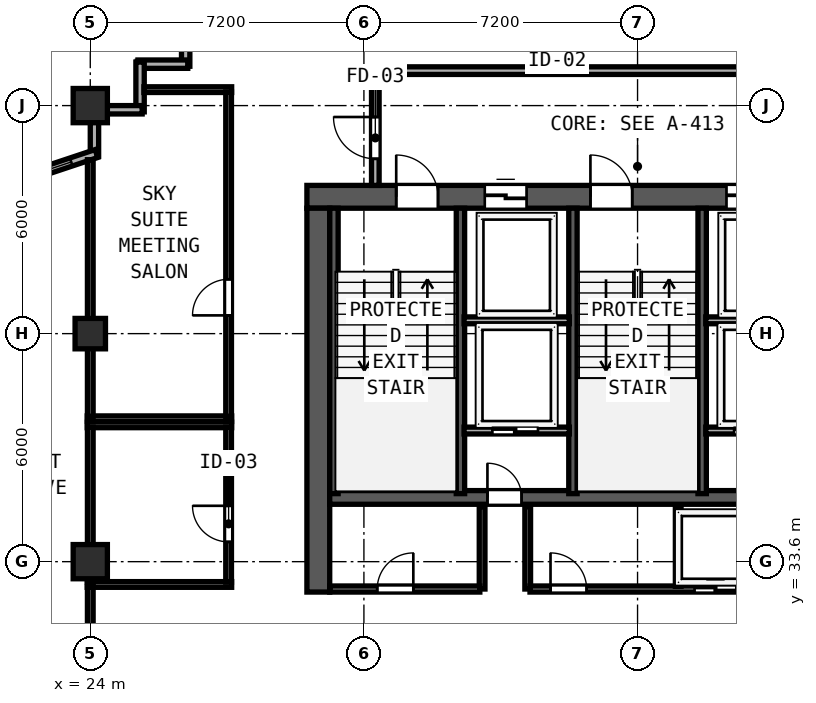
"""IFC4 building model, lengths in metres.
Left out: names, types, materials, properties, quantities, classifications, styles, units other than length and angle.
Written with IfcOpenShell. Run it as: python <this file> out.ifc"""

import sys

from ifc_helpers import new_model, si_unit, direction, frame, frame_2d, origin, origin_2d, place, context, subcontext, project, spatial, rectangle, hollow_rectangle, extrude, element, fill, save


model = new_model("IFC4")
c1 = context("Model", 3, precision=1e-05, world=origin(), true_north=direction((0.0, 1.0)))
c2 = subcontext(c1, "Body", "Model", "MODEL_VIEW")
j1 = project(units=[si_unit("LENGTHUNIT", "METRE"), si_unit("PLANEANGLEUNIT", "RADIAN")], contexts=[c1])
p1 = place(None, origin())
s1 = spatial("IfcSite", under=j1, at=p1, CompositionType="ELEMENT")
p2 = place(p1, origin())
s2 = spatial("IfcBuilding", under=s1, at=p2, CompositionType="ELEMENT")
p3 = place(p2, frame((0.0, 0.0, 191.8)))
s3 = spatial("IfcBuildingStorey", under=s2, at=p3, CompositionType="ELEMENT", Elevation=191.8)
p4 = place(p3, frame((29.7, 43.2, 0.0), z_axis=(0.0, 0.0, 1.0), x_axis=(1.0, 0.0, 0.0)))
e1 = element("IfcWall", 1, at=p4, inside=s3, PredefinedType="SHEAR", context=c2, shape_type="SweptSolid", body=[
    extrude(rectangle(XDim=17.4, YDim=0.6, at=frame_2d((8.7, 0.0))), origin(), (0.0, 0.0, 1.0), 3.62),
])
p5 = place(p4, frame((2.35, 0.0, 0.0)))
e2 = element("IfcOpeningElement", 2, at=p5, cuts=e1, PredefinedType="OPENING", context=c2, shape_type="SweptSolid", body=[
    extrude(rectangle(XDim=1.1, YDim=2.15, at=frame_2d((0.55, 1.075))), frame((0.0, 0.31, 0.0), z_axis=(0.0, -1.0, 0.0), x_axis=(1.0, 0.0, 0.0)), (0.0, 0.0, 1.0), 0.62),
])
p6 = place(p4, frame((7.46, 0.0, 0.0)))
e3 = element("IfcOpeningElement", 3, at=p6, cuts=e1, PredefinedType="OPENING", context=c2, shape_type="SweptSolid", body=[
    extrude(rectangle(XDim=1.1, YDim=2.15, at=frame_2d((0.55, 1.075))), frame((0.0, 0.31, 0.0), z_axis=(0.0, -1.0, 0.0), x_axis=(1.0, 0.0, 0.0)), (0.0, 0.0, 1.0), 0.62),
])
p7 = place(p4, frame((13.55, 0.0, 0.0)))
e4 = element("IfcOpeningElement", 4, at=p7, cuts=e1, PredefinedType="OPENING", context=c2, shape_type="SweptSolid", body=[
    extrude(rectangle(XDim=1.1, YDim=2.15, at=frame_2d((0.55, 1.075))), frame((0.0, 0.31, 0.0), z_axis=(0.0, -1.0, 0.0), x_axis=(1.0, 0.0, 0.0)), (0.0, 0.0, 1.0), 0.62),
])
p8 = place(p4, frame((4.68, 0.0, 0.0)))
e5 = element("IfcOpeningElement", 5, at=p8, cuts=e1, PredefinedType="OPENING", context=c2, shape_type="SweptSolid", body=[
    extrude(rectangle(XDim=1.1, YDim=2.2, at=frame_2d((0.55, 1.1))), frame((0.0, 0.31, 0.0), z_axis=(0.0, -1.0, 0.0), x_axis=(1.0, 0.0, 0.0)), (0.0, 0.0, 1.0), 0.62),
])
p9 = place(p4, frame((11.04, 0.0, 0.0)))
e6 = element("IfcOpeningElement", 6, at=p9, cuts=e1, PredefinedType="OPENING", context=c2, shape_type="SweptSolid", body=[
    extrude(rectangle(XDim=1.1, YDim=2.2, at=frame_2d((0.55, 1.1))), frame((0.0, 0.31, 0.0), z_axis=(0.0, -1.0, 0.0), x_axis=(1.0, 0.0, 0.0)), (0.0, 0.0, 1.0), 0.62),
])
p10 = place(p3, frame((30.0, 32.8, 0.0), z_axis=(0.0, 0.0, 1.0), x_axis=(0.0, 1.0, 0.0)))
e7 = element("IfcWall", 7, at=p10, inside=s3, PredefinedType="SHEAR", context=c2, shape_type="SweptSolid", body=[
    extrude(rectangle(XDim=10.1, YDim=0.6, at=frame_2d((5.05, 0.0))), origin(), (0.0, 0.0, 1.0), 3.62),
])
p11 = place(p3, frame((30.3, 35.29, 0.0), z_axis=(0.0, 0.0, 1.0), x_axis=(1.0, 0.0, 0.0)))
e8 = element("IfcWall", 8, at=p11, inside=s3, PredefinedType="SHEAR", context=c2, shape_type="SweptSolid", body=[
    extrude(rectangle(XDim=16.2, YDim=0.36, at=frame_2d((8.1, 0.0))), origin(), (0.0, 0.0, 1.0), 3.62),
])
p12 = place(p11, frame((5.05, 0.0, 0.0), z_axis=(0.0, 0.0, 1.0), x_axis=(-1.0, 0.0, 0.0)))
e9 = element("IfcOpeningElement", 9, at=p12, cuts=e8, PredefinedType="OPENING", context=c2, shape_type="SweptSolid", body=[
    extrude(rectangle(XDim=0.9, YDim=2.1, at=frame_2d((0.45, 1.05))), frame((0.0, 0.19, 0.0), z_axis=(0.0, -1.0, 0.0), x_axis=(1.0, 0.0, 0.0)), (0.0, 0.0, 1.0), 0.38),
])
p13 = place(p11, frame((12.11, 0.0, 0.0), z_axis=(0.0, 0.0, 1.0), x_axis=(-1.0, 0.0, 0.0)))
e10 = element("IfcOpeningElement", 10, at=p13, cuts=e8, PredefinedType="OPENING", context=c2, shape_type="SweptSolid", body=[
    extrude(rectangle(XDim=0.9, YDim=2.1, at=frame_2d((0.45, 1.05))), frame((0.0, 0.19, 0.0), z_axis=(0.0, -1.0, 0.0), x_axis=(1.0, 0.0, 0.0)), (0.0, 0.0, 1.0), 0.38),
])
for number, where, z_axis, x_axis in (
    (11, (30.412, 35.39, 0.0), (0.0, 0.0, 1.0), (0.0, 1.0, 0.0)),
    (12, (33.74, 35.39, 0.0), (0.0, 0.0, 1.0), (0.0, 1.0, 0.0)),
    (13, (36.7, 35.39, 0.0), (0.0, 0.0, 1.0), (0.0, 1.0, 0.0)),
    (14, (40.1, 35.39, 0.0), (0.0, 0.0, 1.0), (0.0, 1.0, 0.0)),
):
    element("IfcWall", number, at=place(p3, frame(where, z_axis=z_axis, x_axis=x_axis)), inside=s3, PredefinedType="SHEAR", context=c2, shape_type="SweptSolid", body=[
        extrude(rectangle(XDim=7.51, YDim=0.22, at=frame_2d((3.755, 0.0))), origin(), (0.0, 0.0, 1.0), 3.62),
    ])
for number, where, z_axis, x_axis in (
    (15, (24.0, 33.6, 0.0), (0.0, 0.0, 1.0), (1.0, 0.0, 0.0)),
    (16, (24.0, 45.6, 0.0), (0.0, 0.0, 1.0), (1.0, 0.0, 0.0)),
):
    element("IfcColumn", number, at=place(p3, frame(where, z_axis=z_axis, x_axis=x_axis)), inside=s3, PredefinedType="COLUMN", context=c2, shape_type="SweptSolid", body=[
        extrude(hollow_rectangle(XDim=0.9, YDim=0.9, WallThickness=0.034, at=origin_2d()), origin(), (0.0, 0.0, 1.0), 3.8),
    ])
p14 = place(p3, frame((24.0, 39.6, 0.0), z_axis=(0.0, 0.0, 1.0), x_axis=(1.0, 0.0, 0.0)))
e17 = element("IfcColumn", 17, at=p14, inside=s3, PredefinedType="COLUMN", context=c2, shape_type="SweptSolid", body=[
    extrude(hollow_rectangle(XDim=0.8, YDim=0.8, WallThickness=0.03, at=origin_2d()), origin(), (0.0, 0.0, 1.0), 3.8),
])
p15 = place(p3, frame((26.51, 48.0, 0.0), z_axis=(0.0, 0.0, 1.0), x_axis=(0.0, -1.0, 0.0)))
e18 = element("IfcWall", 18, at=p15, inside=s3, PredefinedType="SOLIDWALL", context=c2, shape_type="SweptSolid", body=[
    extrude(rectangle(XDim=1.365, YDim=0.22, at=frame_2d((0.683, 0.0))), origin(), (0.0, 0.0, 1.0), 3.62),
])
for number, where, z_axis, x_axis in (
    (19, (26.565, 46.69, 0.0), (0.0, 0.0, 1.0), (-1.0, 0.0, 0.0)),
    (20, (25.31, 46.745, 0.0), (0.0, 0.0, 1.0), (0.0, -1.0, 0.0)),
):
    element("IfcWall", number, at=place(p3, frame(where, z_axis=z_axis, x_axis=x_axis)), inside=s3, PredefinedType="SOLIDWALL", context=c2, shape_type="SweptSolid", body=[
        extrude(rectangle(XDim=1.31, YDim=0.22, at=frame_2d((0.655, 0.0))), origin(), (0.0, 0.0, 1.0), 3.62),
    ])
p16 = place(p3, frame((25.365, 45.49, 0.0), z_axis=(0.0, 0.0, 1.0), x_axis=(-1.0, 0.0, 0.0)))
e21 = element("IfcWall", 21, at=p16, inside=s3, PredefinedType="SOLIDWALL", context=c2, shape_type="SweptSolid", body=[
    extrude(rectangle(XDim=0.923, YDim=0.22, at=frame_2d((0.461, 0.0))), origin(), (0.0, 0.0, 1.0), 3.62),
])
p17 = place(p3, frame((24.11, 45.158, 0.0), z_axis=(0.0, 0.0, 1.0), x_axis=(0.0, -1.0, 0.0)))
e22 = element("IfcWall", 22, at=p17, inside=s3, PredefinedType="SOLIDWALL", context=c2, shape_type="SweptSolid", body=[
    extrude(rectangle(XDim=0.892, YDim=0.22, at=frame_2d((0.446, 0.0))), origin(), (0.0, 0.0, 1.0), 3.215),
])
p18 = place(p3, frame((24.162, 44.338, 0.0), z_axis=(0.0, 0.0, 1.0), x_axis=(-0.948687265055, -0.316215864755, 0.0)))
e23 = element("IfcWall", 23, at=p18, inside=s3, PredefinedType="SOLIDWALL", context=c2, shape_type="SweptSolid", body=[
    extrude(rectangle(XDim=6.154, YDim=0.22, at=frame_2d((3.077, 0.0))), origin(), (0.0, 0.0, 1.0), 3.215),
])
p19 = place(p18, frame((0.7, 0.0, 0.85)))
e24 = element("IfcOpeningElement", 24, at=p19, cuts=e23, PredefinedType="OPENING", context=c2, shape_type="SweptSolid", body=[
    extrude(rectangle(XDim=1.1, YDim=1.75, at=frame_2d((0.55, 0.875))), frame((0.0, 0.12, 0.0), z_axis=(0.0, -1.0, 0.0), x_axis=(1.0, 0.0, 0.0)), (0.0, 0.0, 1.0), 0.24),
])
p20 = place(p3, frame((31.5, 46.52, 0.0), z_axis=(0.0, 0.0, 1.0), x_axis=(1.0, 0.0, 0.0)))
e25 = element("IfcWall", 25, at=p20, inside=s3, PredefinedType="SOLIDWALL", context=c2, shape_type="SweptSolid", body=[
    extrude(rectangle(XDim=13.8, YDim=0.2, at=frame_2d((6.9, 0.0))), origin(), (0.0, 0.0, 1.0), 3.62),
])
p21 = place(p3, frame((31.5, 43.5, 0.0), z_axis=(0.0, 0.0, 1.0), x_axis=(0.0, 1.0, 0.0)))
e26 = element("IfcWall", 26, at=p21, inside=s3, PredefinedType="SOLIDWALL", context=c2, shape_type="SweptSolid", body=[
    extrude(rectangle(XDim=2.935, YDim=0.2, at=frame_2d((1.468, 0.0))), origin(), (0.0, 0.0, 1.0), 3.62),
])
p22 = place(p21, frame((1.8, 0.0, 0.0), z_axis=(0.0, 0.0, 1.0), x_axis=(-1.0, 0.0, 0.0)))
e27 = element("IfcOpeningElement", 27, at=p22, cuts=e26, PredefinedType="OPENING", context=c2, shape_type="SweptSolid", body=[
    extrude(rectangle(XDim=1.1, YDim=2.15, at=frame_2d((0.55, 1.075))), frame((0.0, 0.11, 0.0), z_axis=(0.0, -1.0, 0.0), x_axis=(1.0, 0.0, 0.0)), (0.0, 0.0, 1.0), 0.22),
])
for number, where, z_axis, x_axis in (
    (28, (33.835, 39.95, 0.0), (0.0, 0.0, 1.0), (1.0, 0.0, 0.0)),
    (29, (40.195, 39.95, 0.0), (0.0, 0.0, 1.0), (1.0, 0.0, 0.0)),
):
    element("IfcWall", number, at=place(p3, frame(where, z_axis=z_axis, x_axis=x_axis)), inside=s3, PredefinedType="SOLIDWALL", context=c2, shape_type="SweptSolid", body=[
        extrude(rectangle(XDim=2.77, YDim=0.18, at=frame_2d((1.385, 0.0))), origin(), (0.0, 0.0, 1.0), 3.62),
    ])
p23 = place(p3, frame((33.835, 37.05, 0.0), z_axis=(0.0, 0.0, 1.0), x_axis=(1.0, 0.0, 0.0)))
e30 = element("IfcWall", 30, at=p23, inside=s3, PredefinedType="SOLIDWALL", context=c2, shape_type="SweptSolid", body=[
    extrude(rectangle(XDim=2.77, YDim=0.18, at=frame_2d((1.385, 0.0))), origin(), (0.0, 0.0, 1.0), 3.62),
])
p24 = place(p23, frame((1.945, 0.0, 0.0), z_axis=(0.0, 0.0, 1.0), x_axis=(-1.0, 0.0, 0.0)))
e31 = element("IfcOpeningElement", 31, at=p24, cuts=e30, PredefinedType="OPENING", context=c2, shape_type="SweptSolid", body=[
    extrude(rectangle(XDim=1.2, YDim=2.2, at=frame_2d((0.6, 1.1))), frame((0.0, 0.1, 0.0), z_axis=(0.0, -1.0, 0.0), x_axis=(1.0, 0.0, 0.0)), (0.0, 0.0, 1.0), 0.2),
])
for number, where, z_axis, x_axis in (
    (32, (34.31, 32.88, 0.0), (0.0, 0.0, 1.0), (0.0, 1.0, 0.0)),
    (33, (35.51, 32.88, 0.0), (0.0, 0.0, 1.0), (0.0, 1.0, 0.0)),
):
    element("IfcWall", number, at=place(p3, frame(where, z_axis=z_axis, x_axis=x_axis)), inside=s3, PredefinedType="SOLIDWALL", context=c2, shape_type="SweptSolid", body=[
        extrude(rectangle(XDim=2.17, YDim=0.15, at=frame_2d((1.085, 0.0))), origin(), (0.0, 0.0, 1.0), 3.62),
    ])
p25 = place(p3, frame((40.195, 37.05, 0.0), z_axis=(0.0, 0.0, 1.0), x_axis=(1.0, 0.0, 0.0)))
e34 = element("IfcWall", 34, at=p25, inside=s3, PredefinedType="SOLIDWALL", context=c2, shape_type="SweptSolid", body=[
    extrude(rectangle(XDim=2.77, YDim=0.18, at=frame_2d((1.385, 0.0))), origin(), (0.0, 0.0, 1.0), 3.62),
])
p26 = place(p25, frame((1.945, 0.0, 0.0), z_axis=(0.0, 0.0, 1.0), x_axis=(-1.0, 0.0, 0.0)))
e35 = element("IfcOpeningElement", 35, at=p26, cuts=e34, PredefinedType="OPENING", context=c2, shape_type="SweptSolid", body=[
    extrude(rectangle(XDim=1.2, YDim=2.2, at=frame_2d((0.6, 1.1))), frame((0.0, 0.1, 0.0), z_axis=(0.0, -1.0, 0.0), x_axis=(1.0, 0.0, 0.0)), (0.0, 0.0, 1.0), 0.2),
])
p27 = place(p3, frame((30.3, 32.88, 0.0), z_axis=(0.0, 0.0, 1.0), x_axis=(1.0, 0.0, 0.0)))
e36 = element("IfcWall", 36, at=p27, inside=s3, PredefinedType="SOLIDWALL", context=c2, shape_type="SweptSolid", body=[
    extrude(rectangle(XDim=3.95, YDim=0.16, at=frame_2d((1.975, 0.0))), origin(), (0.0, 0.0, 1.0), 3.62),
])
p28 = place(p27, frame((2.2, 0.0, 0.0), z_axis=(0.0, 0.0, 1.0), x_axis=(-1.0, 0.0, 0.0)))
e37 = element("IfcOpeningElement", 37, at=p28, cuts=e36, PredefinedType="OPENING", context=c2, shape_type="SweptSolid", body=[
    extrude(rectangle(XDim=0.95, YDim=2.12, at=frame_2d((0.475, 1.06))), frame((0.0, 0.09, 0.0), z_axis=(0.0, -1.0, 0.0), x_axis=(1.0, 0.0, 0.0)), (0.0, 0.0, 1.0), 0.18),
])
p29 = place(p3, frame((35.57, 32.88, 0.0), z_axis=(0.0, 0.0, 1.0), x_axis=(1.0, 0.0, 0.0)))
e38 = element("IfcWall", 38, at=p29, inside=s3, PredefinedType="SOLIDWALL", context=c2, shape_type="SweptSolid", body=[
    extrude(rectangle(XDim=5.74, YDim=0.16, at=frame_2d((2.87, 0.0))), origin(), (0.0, 0.0, 1.0), 3.62),
])
p30 = place(p29, frame((1.49, 0.0, 0.0), z_axis=(0.0, 0.0, 1.0), x_axis=(-1.0, 0.0, 0.0)))
e39 = element("IfcOpeningElement", 39, at=p30, cuts=e38, PredefinedType="OPENING", context=c2, shape_type="SweptSolid", body=[
    extrude(rectangle(XDim=0.95, YDim=2.12, at=frame_2d((0.475, 1.06))), frame((0.0, 0.09, 0.0), z_axis=(0.0, -1.0, 0.0), x_axis=(1.0, 0.0, 0.0)), (0.0, 0.0, 1.0), 0.18),
])
p31 = place(p29, frame((5.43, 0.0, 0.0), z_axis=(0.0, 0.0, 1.0), x_axis=(-1.0, 0.0, 0.0)))
e40 = element("IfcOpeningElement", 40, at=p31, cuts=e38, PredefinedType="OPENING", context=c2, shape_type="SweptSolid", body=[
    extrude(rectangle(XDim=1.1, YDim=2.2, at=frame_2d((0.55, 1.1))), frame((0.0, 0.09, 0.0), z_axis=(0.0, -1.0, 0.0), x_axis=(1.0, 0.0, 0.0)), (0.0, 0.0, 1.0), 0.18),
])
p32 = place(p3, frame((39.47, 32.95, 0.0), z_axis=(0.0, 0.0, 1.0), x_axis=(0.0, 1.0, 0.0)))
e41 = element("IfcWall", 41, at=p32, inside=s3, PredefinedType="SOLIDWALL", context=c2, shape_type="SweptSolid", body=[
    extrude(rectangle(XDim=2.05, YDim=0.15, at=frame_2d((1.025, 0.0))), origin(), (0.0, 0.0, 1.0), 3.62),
])
for number, where, z_axis, x_axis in (
    (42, (23.92, 37.2, 0.0), (0.0, 0.0, 1.0), (1.0, 0.0, 0.0)),
    (43, (23.92, 33.0, 0.0), (0.0, 0.0, 1.0), (1.0, 0.0, 0.0)),
):
    element("IfcWall", number, at=place(p3, frame(where, z_axis=z_axis, x_axis=x_axis)), inside=s3, PredefinedType="PARTITIONING", context=c2, shape_type="SweptSolid", body=[
        extrude(rectangle(XDim=3.8, YDim=0.15, at=frame_2d((1.9, 0.0))), origin(), (0.0, 0.0, 1.0), 3.62),
    ])
p33 = place(p3, frame((24.0, 33.06, 0.0), z_axis=(0.0, 0.0, 1.0), x_axis=(0.0, 1.0, 0.0)))
e44 = element("IfcWall", 44, at=p33, inside=s3, PredefinedType="PARTITIONING", context=c2, shape_type="SweptSolid", body=[
    extrude(rectangle(XDim=4.08, YDim=0.15, at=frame_2d((2.04, 0.0))), origin(), (0.0, 0.0, 1.0), 3.215),
])
p34 = place(p3, frame((27.64, 33.06, 0.0), z_axis=(0.0, 0.0, 1.0), x_axis=(0.0, 1.0, 0.0)))
e45 = element("IfcWall", 45, at=p34, inside=s3, PredefinedType="PARTITIONING", context=c2, shape_type="SweptSolid", body=[
    extrude(rectangle(XDim=4.08, YDim=0.15, at=frame_2d((2.04, 0.0))), origin(), (0.0, 0.0, 1.0), 3.62),
])
p35 = place(p34, frame((2.01, 0.0, 0.0), z_axis=(0.0, 0.0, 1.0), x_axis=(-1.0, 0.0, 0.0)))
e46 = element("IfcOpeningElement", 46, at=p35, cuts=e45, PredefinedType="OPENING", context=c2, shape_type="SweptSolid", body=[
    extrude(rectangle(XDim=0.95, YDim=2.12, at=frame_2d((0.475, 1.06))), frame((0.0, 0.085, 0.0), z_axis=(0.0, -1.0, 0.0), x_axis=(1.0, 0.0, 0.0)), (0.0, 0.0, 1.0), 0.17),
])
p36 = place(p3, frame((25.412, 46.02, 0.0), z_axis=(0.0, 0.0, 1.0), x_axis=(1.0, 0.0, 0.0)))
e47 = element("IfcWall", 47, at=p36, inside=s3, PredefinedType="PARTITIONING", context=c2, shape_type="SweptSolid", body=[
    extrude(rectangle(XDim=2.308, YDim=0.15, at=frame_2d((1.154, 0.0))), origin(), (0.0, 0.0, 1.0), 3.62),
])
p37 = place(p3, frame((23.92, 37.36, 0.0), z_axis=(0.0, 0.0, 1.0), x_axis=(1.0, 0.0, 0.0)))
e48 = element("IfcWall", 48, at=p37, inside=s3, PredefinedType="PARTITIONING", context=c2, shape_type="SweptSolid", body=[
    extrude(rectangle(XDim=3.8, YDim=0.15, at=frame_2d((1.9, 0.0))), origin(), (0.0, 0.0, 1.0), 3.62),
])
p38 = place(p3, frame((24.0, 37.42, 0.0), z_axis=(0.0, 0.0, 1.0), x_axis=(0.0, 1.0, 0.0)))
e49 = element("IfcWall", 49, at=p38, inside=s3, PredefinedType="PARTITIONING", context=c2, shape_type="SweptSolid", body=[
    extrude(rectangle(XDim=6.757, YDim=0.15, at=frame_2d((3.378, 0.0))), origin(), (0.0, 0.0, 1.0), 3.215),
])
p39 = place(p3, frame((27.64, 37.42, 0.0), z_axis=(0.0, 0.0, 1.0), x_axis=(0.0, 1.0, 0.0)))
e50 = element("IfcWall", 50, at=p39, inside=s3, PredefinedType="PARTITIONING", context=c2, shape_type="SweptSolid", body=[
    extrude(rectangle(XDim=8.54, YDim=0.15, at=frame_2d((4.27, 0.0))), origin(), (0.0, 0.0, 1.0), 3.62),
])
p40 = place(p39, frame((3.61, 0.0, 0.0), z_axis=(0.0, 0.0, 1.0), x_axis=(-1.0, 0.0, 0.0)))
e51 = element("IfcOpeningElement", 51, at=p40, cuts=e50, PredefinedType="OPENING", context=c2, shape_type="SweptSolid", body=[
    extrude(rectangle(XDim=0.95, YDim=2.12, at=frame_2d((0.475, 1.06))), frame((0.0, 0.085, 0.0), z_axis=(0.0, -1.0, 0.0), x_axis=(1.0, 0.0, 0.0)), (0.0, 0.0, 1.0), 0.17),
])
p41 = place(p3, frame((24.0, 26.34, 0.0), z_axis=(0.0, 0.0, 1.0), x_axis=(0.0, 1.0, 0.0)))
e52 = element("IfcWall", 52, at=p41, inside=s3, PredefinedType="PARTITIONING", context=c2, shape_type="SweptSolid", body=[
    extrude(rectangle(XDim=6.6, YDim=0.15, at=frame_2d((3.3, 0.0))), origin(), (0.0, 0.0, 1.0), 3.215),
])
p42 = place(p19, origin())
e53 = element("IfcWindow", 53, at=p42, inside=s3, PartitioningType="SINGLE_PANEL", PredefinedType="WINDOW", context=c2, shape_type="SweptSolid", body=[
    extrude(rectangle(XDim=1.1, YDim=1.75, at=frame_2d((0.55, 0.875))), frame((0.0, 0.03, 0.0), z_axis=(0.0, -1.0, 0.0), x_axis=(1.0, 0.0, 0.0)), (0.0, 0.0, 1.0), 0.06),
])
fill(e24, e53)
p43 = place(p5, origin())
e54 = element("IfcDoor", 54, at=p43, inside=s3, OperationType="SINGLE_SWING_LEFT", PredefinedType="DOOR", context=c2, shape_type="SweptSolid", body=[
    extrude(rectangle(XDim=1.1, YDim=2.15, at=frame_2d((0.55, 1.075))), frame((0.0, 0.185, 0.0), z_axis=(0.0, -1.0, 0.0), x_axis=(1.0, 0.0, 0.0)), (0.0, 0.0, 1.0), 0.05),
])
fill(e2, e54)
p44 = place(p6, origin())
e55 = element("IfcDoor", 55, at=p44, inside=s3, OperationType="SINGLE_SWING_LEFT", PredefinedType="DOOR", context=c2, shape_type="SweptSolid", body=[
    extrude(rectangle(XDim=1.1, YDim=2.15, at=frame_2d((0.55, 1.075))), frame((0.0, 0.185, 0.0), z_axis=(0.0, -1.0, 0.0), x_axis=(1.0, 0.0, 0.0)), (0.0, 0.0, 1.0), 0.05),
])
fill(e3, e55)
p45 = place(p22, origin())
e56 = element("IfcDoor", 56, at=p45, inside=s3, OperationType="SINGLE_SWING_LEFT", PredefinedType="DOOR", context=c2, shape_type="SweptSolid", body=[
    extrude(rectangle(XDim=1.1, YDim=2.15, at=frame_2d((0.55, 1.075))), frame((0.0, 0.025, 0.0), z_axis=(0.0, -1.0, 0.0), x_axis=(1.0, 0.0, 0.0)), (0.0, 0.0, 1.0), 0.05),
])
fill(e27, e56)
p46 = place(p8, origin())
e57 = element("IfcDoor", 57, at=p46, inside=s3, OperationType="SLIDING_TO_LEFT", PredefinedType="DOOR", context=c2, shape_type="SweptSolid", body=[
    extrude(rectangle(XDim=1.1, YDim=2.2, at=frame_2d((0.55, 1.1))), frame((0.0, 0.185, 0.0), z_axis=(0.0, -1.0, 0.0), x_axis=(1.0, 0.0, 0.0)), (0.0, 0.0, 1.0), 0.05),
])
fill(e5, e57)
p47 = place(p9, origin())
e58 = element("IfcDoor", 58, at=p47, inside=s3, OperationType="SLIDING_TO_LEFT", PredefinedType="DOOR", context=c2, shape_type="SweptSolid", body=[
    extrude(rectangle(XDim=1.1, YDim=2.2, at=frame_2d((0.55, 1.1))), frame((0.0, 0.185, 0.0), z_axis=(0.0, -1.0, 0.0), x_axis=(1.0, 0.0, 0.0)), (0.0, 0.0, 1.0), 0.05),
])
fill(e6, e58)
p48 = place(p24, origin())
e59 = element("IfcDoor", 59, at=p48, inside=s3, OperationType="SLIDING_TO_RIGHT", PredefinedType="DOOR", context=c2, shape_type="SweptSolid", body=[
    extrude(rectangle(XDim=1.2, YDim=2.2, at=frame_2d((0.6, 1.1))), frame((0.0, 0.025, 0.0), z_axis=(0.0, -1.0, 0.0), x_axis=(1.0, 0.0, 0.0)), (0.0, 0.0, 1.0), 0.05),
])
fill(e31, e59)
p49 = place(p12, origin())
e60 = element("IfcDoor", 60, at=p49, inside=s3, OperationType="SINGLE_SWING_RIGHT", PredefinedType="DOOR", context=c2, shape_type="SweptSolid", body=[
    extrude(rectangle(XDim=0.9, YDim=2.1, at=frame_2d((0.45, 1.05))), frame((0.0, 0.025, 0.0), z_axis=(0.0, -1.0, 0.0), x_axis=(1.0, 0.0, 0.0)), (0.0, 0.0, 1.0), 0.05),
])
fill(e9, e60)
p50 = place(p26, origin())
e61 = element("IfcDoor", 61, at=p50, inside=s3, OperationType="SLIDING_TO_RIGHT", PredefinedType="DOOR", context=c2, shape_type="SweptSolid", body=[
    extrude(rectangle(XDim=1.2, YDim=2.2, at=frame_2d((0.6, 1.1))), frame((0.0, 0.025, 0.0), z_axis=(0.0, -1.0, 0.0), x_axis=(1.0, 0.0, 0.0)), (0.0, 0.0, 1.0), 0.05),
])
fill(e35, e61)
p51 = place(p28, origin())
e62 = element("IfcDoor", 62, at=p51, inside=s3, OperationType="SINGLE_SWING_LEFT", PredefinedType="DOOR", context=c2, shape_type="SweptSolid", body=[
    extrude(rectangle(XDim=0.95, YDim=2.12, at=frame_2d((0.475, 1.06))), frame((0.0, 0.025, 0.0), z_axis=(0.0, -1.0, 0.0), x_axis=(1.0, 0.0, 0.0)), (0.0, 0.0, 1.0), 0.05),
])
fill(e37, e62)
p52 = place(p30, origin())
e63 = element("IfcDoor", 63, at=p52, inside=s3, OperationType="SINGLE_SWING_RIGHT", PredefinedType="DOOR", context=c2, shape_type="SweptSolid", body=[
    extrude(rectangle(XDim=0.95, YDim=2.12, at=frame_2d((0.475, 1.06))), frame((0.0, 0.025, 0.0), z_axis=(0.0, -1.0, 0.0), x_axis=(1.0, 0.0, 0.0)), (0.0, 0.0, 1.0), 0.05),
])
fill(e39, e63)
p53 = place(p31, origin())
e64 = element("IfcDoor", 64, at=p53, inside=s3, OperationType="SLIDING_TO_RIGHT", PredefinedType="DOOR", context=c2, shape_type="SweptSolid", body=[
    extrude(rectangle(XDim=1.1, YDim=2.2, at=frame_2d((0.55, 1.1))), frame((0.0, 0.025, 0.0), z_axis=(0.0, -1.0, 0.0), x_axis=(1.0, 0.0, 0.0)), (0.0, 0.0, 1.0), 0.05),
])
fill(e40, e64)
p54 = place(p35, origin())
e65 = element("IfcDoor", 65, at=p54, inside=s3, OperationType="SINGLE_SWING_LEFT", PredefinedType="DOOR", context=c2, shape_type="SweptSolid", body=[
    extrude(rectangle(XDim=0.95, YDim=2.12, at=frame_2d((0.475, 1.06))), frame((0.0, 0.025, 0.0), z_axis=(0.0, -1.0, 0.0), x_axis=(1.0, 0.0, 0.0)), (0.0, 0.0, 1.0), 0.05),
])
fill(e46, e65)
p55 = place(p40, origin())
e66 = element("IfcDoor", 66, at=p55, inside=s3, OperationType="SINGLE_SWING_RIGHT", PredefinedType="DOOR", context=c2, shape_type="SweptSolid", body=[
    extrude(rectangle(XDim=0.95, YDim=2.12, at=frame_2d((0.475, 1.06))), frame((0.0, 0.025, 0.0), z_axis=(0.0, -1.0, 0.0), x_axis=(1.0, 0.0, 0.0)), (0.0, 0.0, 1.0), 0.05),
])
fill(e51, e66)
save(model, sys.argv[1])
